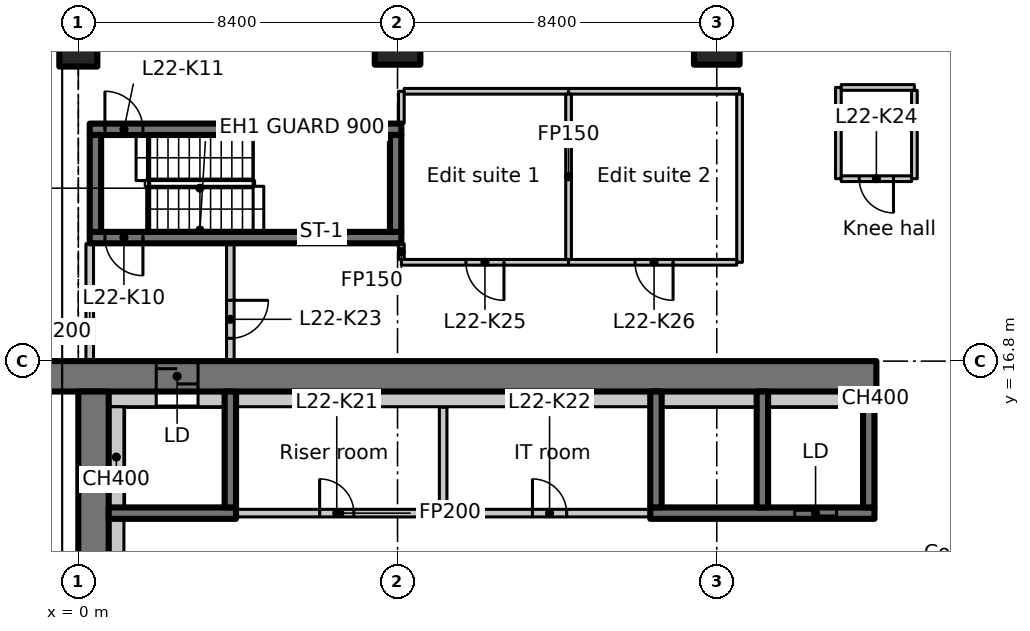
"""IFC4 building model, lengths in metres.
Left out: names, types, materials, properties, quantities, classifications, styles, units other than length and angle.
Written with IfcOpenShell. Run it as: python <this file> out.ifc"""

import sys

from ifc_helpers import new_model, si_unit, direction, frame, frame_2d, origin, origin_2d, place, context, subcontext, project, spatial, rectangle, extrude, element, fill, save


model = new_model("IFC4")
c1 = context("Model", 3, precision=1e-05, world=origin(), true_north=direction((0.0, 1.0)))
c2 = subcontext(c1, "Body", "Model", "MODEL_VIEW")
j1 = project(units=[si_unit("LENGTHUNIT", "METRE"), si_unit("PLANEANGLEUNIT", "RADIAN")], contexts=[c1])
p1 = place(None, origin())
s1 = spatial("IfcSite", under=j1, at=p1, CompositionType="ELEMENT")
p2 = place(p1, origin())
s2 = spatial("IfcBuilding", under=s1, at=p2, CompositionType="ELEMENT")
p3 = place(p2, frame((0.0, 0.0, 95.3)))
s3 = spatial("IfcBuildingStorey", under=s2, at=p3, CompositionType="ELEMENT", Elevation=95.3)
p4 = place(p3, frame((0.0, 25.2, 0.0), z_axis=(0.0, 0.0, 1.0), x_axis=(1.0, 0.0, 0.0)))
e1 = element("IfcColumn", 1, at=p4, inside=s3, PredefinedType="COLUMN", context=c2, shape_type="SweptSolid", body=[
    extrude(rectangle(XDim=1.0, YDim=1.3, at=origin_2d()), origin(), (0.0, 0.0, 1.0), 3.35),
])
for number, where, z_axis, x_axis in (
    (2, (8.4, 25.2, 0.0), (0.0, 0.0, 1.0), (1.0, 0.0, 0.0)),
    (3, (16.8, 25.2, 0.0), (0.0, 0.0, 1.0), (1.0, 0.0, 0.0)),
):
    element("IfcColumn", number, at=place(p3, frame(where, z_axis=z_axis, x_axis=x_axis)), inside=s3, PredefinedType="COLUMN", context=c2, shape_type="SweptSolid", body=[
        extrude(rectangle(XDim=1.2, YDim=1.2, at=origin_2d()), origin(), (0.0, 0.0, 1.0), 3.35),
    ])
p5 = place(p3, frame((-1.1, 16.4, 0.0), z_axis=(0.0, 0.0, 1.0), x_axis=(1.0, 0.0, 0.0)))
e4 = element("IfcWall", 4, at=p5, inside=s3, PredefinedType="SHEAR", context=c2, shape_type="SweptSolid", body=[
    extrude(rectangle(XDim=22.1, YDim=0.8, at=frame_2d((11.05, 0.0))), origin(), (0.0, 0.0, 1.0), 3.35),
])
p6 = place(p5, frame((3.15, 0.0, 0.0)))
e5 = element("IfcOpeningElement", 5, at=p6, cuts=e4, PredefinedType="OPENING", context=c2, shape_type="SweptSolid", body=[
    extrude(rectangle(XDim=1.1, YDim=2.3, at=frame_2d((0.55, 1.15))), frame((0.0, 0.41, 0.0), z_axis=(0.0, -1.0, 0.0), x_axis=(1.0, 0.0, 0.0)), (0.0, 0.0, 1.0), 0.82),
])
p7 = place(p3, frame((0.4, 7.136, 0.0), z_axis=(0.0, 0.0, 1.0), x_axis=(0.0, 1.0, 0.0)))
e6 = element("IfcWall", 6, at=p7, inside=s3, PredefinedType="SHEAR", context=c2, shape_type="SweptSolid", body=[
    extrude(rectangle(XDim=8.864, YDim=0.8, at=frame_2d((4.432, 0.0))), origin(), (0.0, 0.0, 1.0), 3.35),
])
p8 = place(p3, frame((0.8, 15.8, 0.0), z_axis=(0.0, 0.0, 1.0), x_axis=(1.0, 0.0, 0.0)))
e7 = element("IfcWall", 7, at=p8, inside=s3, PredefinedType="PARTITIONING", context=c2, shape_type="SweptSolid", body=[
    extrude(rectangle(XDim=1.25, YDim=0.4, at=frame_2d((0.625, 0.0))), origin(), (0.0, 0.0, 1.0), 3.35),
])
p9 = place(p3, frame((0.8, 12.8, 0.0), z_axis=(0.0, 0.0, 1.0), x_axis=(1.0, 0.0, 0.0)))
e8 = element("IfcWall", 8, at=p9, inside=s3, PredefinedType="SHEAR", context=c2, shape_type="SweptSolid", body=[
    extrude(rectangle(XDim=3.35, YDim=0.3, at=frame_2d((1.675, 0.0))), origin(), (0.0, 0.0, 1.0), 3.35),
])
p10 = place(p3, frame((4.0, 12.95, 0.0), z_axis=(0.0, 0.0, 1.0), x_axis=(0.0, 1.0, 0.0)))
e9 = element("IfcWall", 9, at=p10, inside=s3, PredefinedType="SHEAR", context=c2, shape_type="SweptSolid", body=[
    extrude(rectangle(XDim=3.05, YDim=0.3, at=frame_2d((1.525, 0.0))), origin(), (0.0, 0.0, 1.0), 3.35),
])
p11 = place(p3, frame((15.05, 12.8, 0.0), z_axis=(0.0, 0.0, 1.0), x_axis=(1.0, 0.0, 0.0)))
e10 = element("IfcWall", 10, at=p11, inside=s3, PredefinedType="SHEAR", context=c2, shape_type="SweptSolid", body=[
    extrude(rectangle(XDim=5.9, YDim=0.3, at=frame_2d((2.95, 0.0))), origin(), (0.0, 0.0, 1.0), 3.35),
])
p12 = place(p11, frame((3.8, 0.0, 0.0)))
e11 = element("IfcOpeningElement", 11, at=p12, cuts=e10, PredefinedType="OPENING", context=c2, shape_type="SweptSolid", body=[
    extrude(rectangle(XDim=1.1, YDim=2.3, at=frame_2d((0.55, 1.15))), frame((0.0, 0.16, 0.0), z_axis=(0.0, -1.0, 0.0), x_axis=(1.0, 0.0, 0.0)), (0.0, 0.0, 1.0), 0.32),
])
for number, where, z_axis, x_axis in (
    (12, (15.2, 12.95, 0.0), (0.0, 0.0, 1.0), (0.0, 1.0, 0.0)),
    (13, (18.0, 12.95, 0.0), (0.0, 0.0, 1.0), (0.0, 1.0, 0.0)),
    (14, (20.8, 12.95, 0.0), (0.0, 0.0, 1.0), (0.0, 1.0, 0.0)),
):
    element("IfcWall", number, at=place(p3, frame(where, z_axis=z_axis, x_axis=x_axis)), inside=s3, PredefinedType="SHEAR", context=c2, shape_type="SweptSolid", body=[
        extrude(rectangle(XDim=3.05, YDim=0.3, at=frame_2d((1.525, 0.0))), origin(), (0.0, 0.0, 1.0), 3.35),
    ])
p13 = place(p3, frame((8.5, 20.05, 0.0), z_axis=(0.0, 0.0, 1.0), x_axis=(-1.0, 0.0, 0.0)))
e15 = element("IfcWall", 15, at=p13, inside=s3, PredefinedType="SHEAR", context=c2, shape_type="SweptSolid", body=[
    extrude(rectangle(XDim=8.2, YDim=0.3, at=frame_2d((4.1, 0.0))), origin(), (0.0, 0.0, 1.0), 3.35),
])
p14 = place(p13, frame((6.8, 0.0, 0.0)))
e16 = element("IfcOpeningElement", 16, at=p14, cuts=e15, PredefinedType="OPENING", context=c2, shape_type="SweptSolid", body=[
    extrude(rectangle(XDim=1.0, YDim=2.1, at=frame_2d((0.5, 1.05))), frame((0.0, 0.16, 0.0), z_axis=(0.0, -1.0, 0.0), x_axis=(1.0, 0.0, 0.0)), (0.0, 0.0, 1.0), 0.32),
])
p15 = place(p3, frame((0.3, 22.9, 0.0), z_axis=(0.0, 0.0, 1.0), x_axis=(1.0, 0.0, 0.0)))
e17 = element("IfcWall", 17, at=p15, inside=s3, PredefinedType="SHEAR", context=c2, shape_type="SweptSolid", body=[
    extrude(rectangle(XDim=8.2, YDim=0.3, at=frame_2d((4.1, 0.0))), origin(), (0.0, 0.0, 1.0), 3.35),
])
p16 = place(p15, frame((0.4, 0.0, 0.0)))
e18 = element("IfcOpeningElement", 18, at=p16, cuts=e17, PredefinedType="OPENING", context=c2, shape_type="SweptSolid", body=[
    extrude(rectangle(XDim=1.0, YDim=2.1, at=frame_2d((0.5, 1.05))), frame((0.0, 0.16, 0.0), z_axis=(0.0, -1.0, 0.0), x_axis=(1.0, 0.0, 0.0)), (0.0, 0.0, 1.0), 0.32),
])
for number, where, z_axis, x_axis in (
    (19, (0.45, 20.2, 0.0), (0.0, 0.0, 1.0), (0.0, 1.0, 0.0)),
    (20, (8.35, 20.2, 0.0), (0.0, 0.0, 1.0), (0.0, 1.0, 0.0)),
):
    element("IfcWall", number, at=place(p3, frame(where, z_axis=z_axis, x_axis=x_axis)), inside=s3, PredefinedType="SHEAR", context=c2, shape_type="SweptSolid", body=[
        extrude(rectangle(XDim=2.55, YDim=0.3, at=frame_2d((1.275, 0.0))), origin(), (0.0, 0.0, 1.0), 3.35),
    ])
p17 = place(p3, frame((0.3, 16.812, 0.0), z_axis=(0.0, 0.0, 1.0), x_axis=(0.0, 1.0, 0.0)))
e21 = element("IfcWall", 21, at=p17, inside=s3, PredefinedType="PARTITIONING", context=c2, shape_type="SweptSolid", body=[
    extrude(rectangle(XDim=3.076, YDim=0.2, at=frame_2d((1.538, 0.0))), origin(), (0.0, 0.0, 1.0), 2.98),
])
p18 = place(p3, frame((4.0, 19.888, 0.0), z_axis=(0.0, 0.0, 1.0), x_axis=(0.0, -1.0, 0.0)))
e22 = element("IfcWall", 22, at=p18, inside=s3, PredefinedType="PARTITIONING", context=c2, shape_type="SweptSolid", body=[
    extrude(rectangle(XDim=3.076, YDim=0.2, at=frame_2d((1.538, 0.0))), origin(), (0.0, 0.0, 1.0), 3.35),
])
p19 = place(p18, frame((1.488, 0.0, 0.0)))
e23 = element("IfcOpeningElement", 23, at=p19, cuts=e22, PredefinedType="OPENING", context=c2, shape_type="SweptSolid", body=[
    extrude(rectangle(XDim=1.0, YDim=2.1, at=frame_2d((0.5, 1.05))), frame((0.0, 0.11, 0.0), z_axis=(0.0, -1.0, 0.0), x_axis=(1.0, 0.0, 0.0)), (0.0, 0.0, 1.0), 0.22),
])
p20 = place(p3, frame((4.162, 12.8, 0.0), z_axis=(0.0, 0.0, 1.0), x_axis=(1.0, 0.0, 0.0)))
e24 = element("IfcWall", 24, at=p20, inside=s3, PredefinedType="PARTITIONING", context=c2, shape_type="SweptSolid", body=[
    extrude(rectangle(XDim=5.438, YDim=0.2, at=frame_2d((2.719, 0.0))), origin(), (0.0, 0.0, 1.0), 3.35),
])
p21 = place(p20, frame((2.188, 0.0, 0.0)))
e25 = element("IfcOpeningElement", 25, at=p21, cuts=e24, PredefinedType="OPENING", context=c2, shape_type="SweptSolid", body=[
    extrude(rectangle(XDim=0.9, YDim=2.1, at=frame_2d((0.45, 1.05))), frame((0.0, 0.11, 0.0), z_axis=(0.0, -1.0, 0.0), x_axis=(1.0, 0.0, 0.0)), (0.0, 0.0, 1.0), 0.22),
])
p22 = place(p3, frame((9.6, 12.8, 0.0), z_axis=(0.0, 0.0, 1.0), x_axis=(1.0, 0.0, 0.0)))
e26 = element("IfcWall", 26, at=p22, inside=s3, PredefinedType="PARTITIONING", context=c2, shape_type="SweptSolid", body=[
    extrude(rectangle(XDim=5.438, YDim=0.2, at=frame_2d((2.719, 0.0))), origin(), (0.0, 0.0, 1.0), 3.35),
])
p23 = place(p22, frame((2.35, 0.0, 0.0)))
e27 = element("IfcOpeningElement", 27, at=p23, cuts=e26, PredefinedType="OPENING", context=c2, shape_type="SweptSolid", body=[
    extrude(rectangle(XDim=0.9, YDim=2.1, at=frame_2d((0.45, 1.05))), frame((0.0, 0.11, 0.0), z_axis=(0.0, -1.0, 0.0), x_axis=(1.0, 0.0, 0.0)), (0.0, 0.0, 1.0), 0.22),
])
p24 = place(p3, frame((9.6, 15.588, 0.0), z_axis=(0.0, 0.0, 1.0), x_axis=(0.0, -1.0, 0.0)))
e28 = element("IfcWall", 28, at=p24, inside=s3, PredefinedType="PARTITIONING", context=c2, shape_type="SweptSolid", body=[
    extrude(rectangle(XDim=2.688, YDim=0.2, at=frame_2d((1.344, 0.0))), origin(), (0.0, 0.0, 1.0), 3.35),
])
p25 = place(p3, frame((12.9, 19.4, 0.0), z_axis=(0.0, 0.0, 1.0), x_axis=(-1.0, 0.0, 0.0)))
e29 = element("IfcWall", 29, at=p25, inside=s3, PredefinedType="PARTITIONING", context=c2, shape_type="SweptSolid", body=[
    extrude(rectangle(XDim=4.4, YDim=0.15, at=frame_2d((2.2, 0.0))), origin(), (0.0, 0.0, 1.0), 3.35),
])
p26 = place(p25, frame((1.7, 0.0, 0.0)))
e30 = element("IfcOpeningElement", 30, at=p26, cuts=e29, PredefinedType="OPENING", context=c2, shape_type="SweptSolid", body=[
    extrude(rectangle(XDim=1.0, YDim=2.1, at=frame_2d((0.5, 1.05))), frame((0.0, 0.085, 0.0), z_axis=(0.0, -1.0, 0.0), x_axis=(1.0, 0.0, 0.0)), (0.0, 0.0, 1.0), 0.17),
])
p27 = place(p3, frame((8.5, 19.475, 0.0), z_axis=(0.0, 0.0, 1.0), x_axis=(0.0, 1.0, 0.0)))
e31 = element("IfcWall", 31, at=p27, inside=s3, PredefinedType="PARTITIONING", context=c2, shape_type="SweptSolid", body=[
    extrude(rectangle(XDim=0.413, YDim=0.15, at=frame_2d((0.207, 0.0))), origin(), (0.0, 0.0, 1.0), 3.35),
])
p28 = place(p3, frame((8.5, 23.062, 0.0), z_axis=(0.0, 0.0, 1.0), x_axis=(0.0, 1.0, 0.0)))
e32 = element("IfcWall", 32, at=p28, inside=s3, PredefinedType="PARTITIONING", context=c2, shape_type="SweptSolid", body=[
    extrude(rectangle(XDim=0.838, YDim=0.15, at=frame_2d((0.419, 0.0))), origin(), (0.0, 0.0, 1.0), 3.35),
])
p29 = place(p3, frame((8.575, 23.9, 0.0), z_axis=(0.0, 0.0, 1.0), x_axis=(1.0, 0.0, 0.0)))
e33 = element("IfcWall", 33, at=p29, inside=s3, PredefinedType="PARTITIONING", context=c2, shape_type="SweptSolid", body=[
    extrude(rectangle(XDim=4.325, YDim=0.15, at=frame_2d((2.163, 0.0))), origin(), (0.0, 0.0, 1.0), 3.35),
])
p30 = place(p3, frame((12.9, 23.9, 0.0), z_axis=(0.0, 0.0, 1.0), x_axis=(1.0, 0.0, 0.0)))
e34 = element("IfcWall", 34, at=p30, inside=s3, PredefinedType="PARTITIONING", context=c2, shape_type="SweptSolid", body=[
    extrude(rectangle(XDim=4.5, YDim=0.15, at=frame_2d((2.25, 0.0))), origin(), (0.0, 0.0, 1.0), 3.35),
])
p31 = place(p3, frame((17.4, 23.825, 0.0), z_axis=(0.0, 0.0, 1.0), x_axis=(0.0, -1.0, 0.0)))
e35 = element("IfcWall", 35, at=p31, inside=s3, PredefinedType="PARTITIONING", context=c2, shape_type="SweptSolid", body=[
    extrude(rectangle(XDim=4.425, YDim=0.15, at=frame_2d((2.212, 0.0))), origin(), (0.0, 0.0, 1.0), 3.35),
])
p32 = place(p3, frame((17.325, 19.4, 0.0), z_axis=(0.0, 0.0, 1.0), x_axis=(-1.0, 0.0, 0.0)))
e36 = element("IfcWall", 36, at=p32, inside=s3, PredefinedType="PARTITIONING", context=c2, shape_type="SweptSolid", body=[
    extrude(rectangle(XDim=4.425, YDim=0.15, at=frame_2d((2.212, 0.0))), origin(), (0.0, 0.0, 1.0), 3.35),
])
p33 = place(p32, frame((1.675, 0.0, 0.0)))
e37 = element("IfcOpeningElement", 37, at=p33, cuts=e36, PredefinedType="OPENING", context=c2, shape_type="SweptSolid", body=[
    extrude(rectangle(XDim=1.0, YDim=2.1, at=frame_2d((0.5, 1.05))), frame((0.0, 0.085, 0.0), z_axis=(0.0, -1.0, 0.0), x_axis=(1.0, 0.0, 0.0)), (0.0, 0.0, 1.0), 0.17),
])
p34 = place(p3, frame((12.9, 23.825, 0.0), z_axis=(0.0, 0.0, 1.0), x_axis=(0.0, -1.0, 0.0)))
e38 = element("IfcWall", 38, at=p34, inside=s3, PredefinedType="PARTITIONING", context=c2, shape_type="SweptSolid", body=[
    extrude(rectangle(XDim=4.35, YDim=0.15, at=frame_2d((2.175, 0.0))), origin(), (0.0, 0.0, 1.0), 3.35),
])
p35 = place(p3, frame((20.0, 21.6, 0.0), z_axis=(0.0, 0.0, 1.0), x_axis=(0.0, 1.0, 0.0)))
e39 = element("IfcWall", 39, at=p35, inside=s3, PredefinedType="PARTITIONING", context=c2, shape_type="SweptSolid", body=[
    extrude(rectangle(XDim=2.4, YDim=0.15, at=frame_2d((1.2, 0.0))), origin(), (0.0, 0.0, 1.0), 3.35),
])
p36 = place(p3, frame((20.075, 24.0, 0.0), z_axis=(0.0, 0.0, 1.0), x_axis=(1.0, 0.0, 0.0)))
e40 = element("IfcWall", 40, at=p36, inside=s3, PredefinedType="PARTITIONING", context=c2, shape_type="SweptSolid", body=[
    extrude(rectangle(XDim=1.925, YDim=0.15, at=frame_2d((0.962, 0.0))), origin(), (0.0, 0.0, 1.0), 3.35),
])
p37 = place(p3, frame((22.0, 23.925, 0.0), z_axis=(0.0, 0.0, 1.0), x_axis=(0.0, -1.0, 0.0)))
e41 = element("IfcWall", 41, at=p37, inside=s3, PredefinedType="PARTITIONING", context=c2, shape_type="SweptSolid", body=[
    extrude(rectangle(XDim=2.325, YDim=0.15, at=frame_2d((1.163, 0.0))), origin(), (0.0, 0.0, 1.0), 3.35),
])
p38 = place(p3, frame((21.925, 21.6, 0.0), z_axis=(0.0, 0.0, 1.0), x_axis=(-1.0, 0.0, 0.0)))
e42 = element("IfcWall", 42, at=p38, inside=s3, PredefinedType="PARTITIONING", context=c2, shape_type="SweptSolid", body=[
    extrude(rectangle(XDim=1.85, YDim=0.15, at=frame_2d((0.925, 0.0))), origin(), (0.0, 0.0, 1.0), 3.35),
])
p39 = place(p38, frame((0.475, 0.0, 0.0)))
e43 = element("IfcOpeningElement", 43, at=p39, cuts=e42, PredefinedType="OPENING", context=c2, shape_type="SweptSolid", body=[
    extrude(rectangle(XDim=0.9, YDim=2.1, at=frame_2d((0.45, 1.05))), frame((0.0, 0.085, 0.0), z_axis=(0.0, -1.0, 0.0), x_axis=(1.0, 0.0, 0.0)), (0.0, 0.0, 1.0), 0.17),
])
p40 = place(p3, frame((1.0, 9.75, 0.0), z_axis=(0.0, 0.0, 1.0), x_axis=(0.0, 1.0, 0.0)))
e44 = element("IfcWall", 44, at=p40, inside=s3, PredefinedType="PARTITIONING", context=c2, shape_type="SweptSolid", body=[
    extrude(rectangle(XDim=2.9, YDim=0.4, at=frame_2d((1.45, 0.0))), origin(), (0.0, 0.0, 1.0), 3.35),
])
p41 = place(p3, frame((1.0, 12.95, 0.0), z_axis=(0.0, 0.0, 1.0), x_axis=(0.0, 1.0, 0.0)))
e45 = element("IfcWall", 45, at=p41, inside=s3, PredefinedType="PARTITIONING", context=c2, shape_type="SweptSolid", body=[
    extrude(rectangle(XDim=2.65, YDim=0.4, at=frame_2d((1.325, 0.0))), origin(), (0.0, 0.0, 1.0), 3.35),
])
p42 = place(p3, frame((3.15, 15.8, 0.0), z_axis=(0.0, 0.0, 1.0), x_axis=(1.0, 0.0, 0.0)))
e46 = element("IfcWall", 46, at=p42, inside=s3, PredefinedType="PARTITIONING", context=c2, shape_type="SweptSolid", body=[
    extrude(rectangle(XDim=0.7, YDim=0.4, at=frame_2d((0.35, 0.0))), origin(), (0.0, 0.0, 1.0), 3.35),
])
p43 = place(p3, frame((4.15, 15.8, 0.0), z_axis=(0.0, 0.0, 1.0), x_axis=(1.0, 0.0, 0.0)))
e47 = element("IfcWall", 47, at=p43, inside=s3, PredefinedType="PARTITIONING", context=c2, shape_type="SweptSolid", body=[
    extrude(rectangle(XDim=10.9, YDim=0.4, at=frame_2d((5.45, 0.0))), origin(), (0.0, 0.0, 1.0), 3.35),
])
for number, where, z_axis, x_axis in (
    (48, (15.35, 15.8, 0.0), (0.0, 0.0, 1.0), (1.0, 0.0, 0.0)),
    (49, (18.15, 15.8, 0.0), (0.0, 0.0, 1.0), (1.0, 0.0, 0.0)),
):
    element("IfcWall", number, at=place(p3, frame(where, z_axis=z_axis, x_axis=x_axis)), inside=s3, PredefinedType="PARTITIONING", context=c2, shape_type="SweptSolid", body=[
        extrude(rectangle(XDim=2.5, YDim=0.4, at=frame_2d((1.25, 0.0))), origin(), (0.0, 0.0, 1.0), 3.35),
    ])
p44 = place(p3, frame((20.95, 15.8, 0.0), z_axis=(0.0, 0.0, 1.0), x_axis=(1.0, 0.0, 0.0)))
e50 = element("IfcWall", 50, at=p44, inside=s3, PredefinedType="PARTITIONING", context=c2, shape_type="SweptSolid", body=[
    extrude(rectangle(XDim=0.05, YDim=0.4, at=frame_2d((0.025, 0.0))), origin(), (0.0, 0.0, 1.0), 3.35),
])
p45 = place(p6, origin())
e51 = element("IfcDoor", 51, at=p45, inside=s3, OperationType="SLIDING_TO_LEFT", PredefinedType="DOOR", context=c2, shape_type="SweptSolid", body=[
    extrude(rectangle(XDim=1.1, YDim=2.3, at=frame_2d((0.55, 1.15))), frame((0.0, 0.025, 0.0), z_axis=(0.0, -1.0, 0.0), x_axis=(1.0, 0.0, 0.0)), (0.0, 0.0, 1.0), 0.05),
])
fill(e5, e51)
p46 = place(p12, origin())
e52 = element("IfcDoor", 52, at=p46, inside=s3, OperationType="SLIDING_TO_LEFT", PredefinedType="DOOR", context=c2, shape_type="SweptSolid", body=[
    extrude(rectangle(XDim=1.1, YDim=2.3, at=frame_2d((0.55, 1.15))), frame((0.0, 0.025, 0.0), z_axis=(0.0, -1.0, 0.0), x_axis=(1.0, 0.0, 0.0)), (0.0, 0.0, 1.0), 0.05),
])
fill(e11, e52)
p47 = place(p14, origin())
e53 = element("IfcDoor", 53, at=p47, inside=s3, OperationType="SINGLE_SWING_LEFT", PredefinedType="DOOR", context=c2, shape_type="SweptSolid", body=[
    extrude(rectangle(XDim=1.0, YDim=2.1, at=frame_2d((0.5, 1.05))), frame((0.0, 0.025, 0.0), z_axis=(0.0, -1.0, 0.0), x_axis=(1.0, 0.0, 0.0)), (0.0, 0.0, 1.0), 0.05),
])
fill(e16, e53)
p48 = place(p16, origin())
e54 = element("IfcDoor", 54, at=p48, inside=s3, OperationType="SINGLE_SWING_RIGHT", PredefinedType="DOOR", context=c2, shape_type="SweptSolid", body=[
    extrude(rectangle(XDim=1.0, YDim=2.1, at=frame_2d((0.5, 1.05))), frame((0.0, 0.025, 0.0), z_axis=(0.0, -1.0, 0.0), x_axis=(1.0, 0.0, 0.0)), (0.0, 0.0, 1.0), 0.05),
])
fill(e18, e54)
p49 = place(p21, origin())
e55 = element("IfcDoor", 55, at=p49, inside=s3, OperationType="SINGLE_SWING_RIGHT", PredefinedType="DOOR", context=c2, shape_type="SweptSolid", body=[
    extrude(rectangle(XDim=0.9, YDim=2.1, at=frame_2d((0.45, 1.05))), frame((0.0, 0.025, 0.0), z_axis=(0.0, -1.0, 0.0), x_axis=(1.0, 0.0, 0.0)), (0.0, 0.0, 1.0), 0.05),
])
fill(e25, e55)
p50 = place(p23, origin())
e56 = element("IfcDoor", 56, at=p50, inside=s3, OperationType="SINGLE_SWING_LEFT", PredefinedType="DOOR", context=c2, shape_type="SweptSolid", body=[
    extrude(rectangle(XDim=0.9, YDim=2.1, at=frame_2d((0.45, 1.05))), frame((0.0, 0.025, 0.0), z_axis=(0.0, -1.0, 0.0), x_axis=(1.0, 0.0, 0.0)), (0.0, 0.0, 1.0), 0.05),
])
fill(e27, e56)
p51 = place(p19, origin())
e57 = element("IfcDoor", 57, at=p51, inside=s3, OperationType="SINGLE_SWING_RIGHT", PredefinedType="DOOR", context=c2, shape_type="SweptSolid", body=[
    extrude(rectangle(XDim=1.0, YDim=2.1, at=frame_2d((0.5, 1.05))), frame((0.0, 0.025, 0.0), z_axis=(0.0, -1.0, 0.0), x_axis=(1.0, 0.0, 0.0)), (0.0, 0.0, 1.0), 0.05),
])
fill(e23, e57)
p52 = place(p39, origin())
e58 = element("IfcDoor", 58, at=p52, inside=s3, OperationType="SINGLE_SWING_LEFT", PredefinedType="DOOR", context=c2, shape_type="SweptSolid", body=[
    extrude(rectangle(XDim=0.9, YDim=2.1, at=frame_2d((0.45, 1.05))), frame((0.0, 0.025, 0.0), z_axis=(0.0, -1.0, 0.0), x_axis=(1.0, 0.0, 0.0)), (0.0, 0.0, 1.0), 0.05),
])
fill(e43, e58)
p53 = place(p26, origin())
e59 = element("IfcDoor", 59, at=p53, inside=s3, OperationType="SINGLE_SWING_RIGHT", PredefinedType="DOOR", context=c2, shape_type="SweptSolid", body=[
    extrude(rectangle(XDim=1.0, YDim=2.1, at=frame_2d((0.5, 1.05))), frame((0.0, 0.025, 0.0), z_axis=(0.0, -1.0, 0.0), x_axis=(1.0, 0.0, 0.0)), (0.0, 0.0, 1.0), 0.05),
])
fill(e30, e59)
p54 = place(p33, origin())
e60 = element("IfcDoor", 60, at=p54, inside=s3, OperationType="SINGLE_SWING_LEFT", PredefinedType="DOOR", context=c2, shape_type="SweptSolid", body=[
    extrude(rectangle(XDim=1.0, YDim=2.1, at=frame_2d((0.5, 1.05))), frame((0.0, 0.025, 0.0), z_axis=(0.0, -1.0, 0.0), x_axis=(1.0, 0.0, 0.0)), (0.0, 0.0, 1.0), 0.05),
])
fill(e37, e60)
save(model, sys.argv[1])
